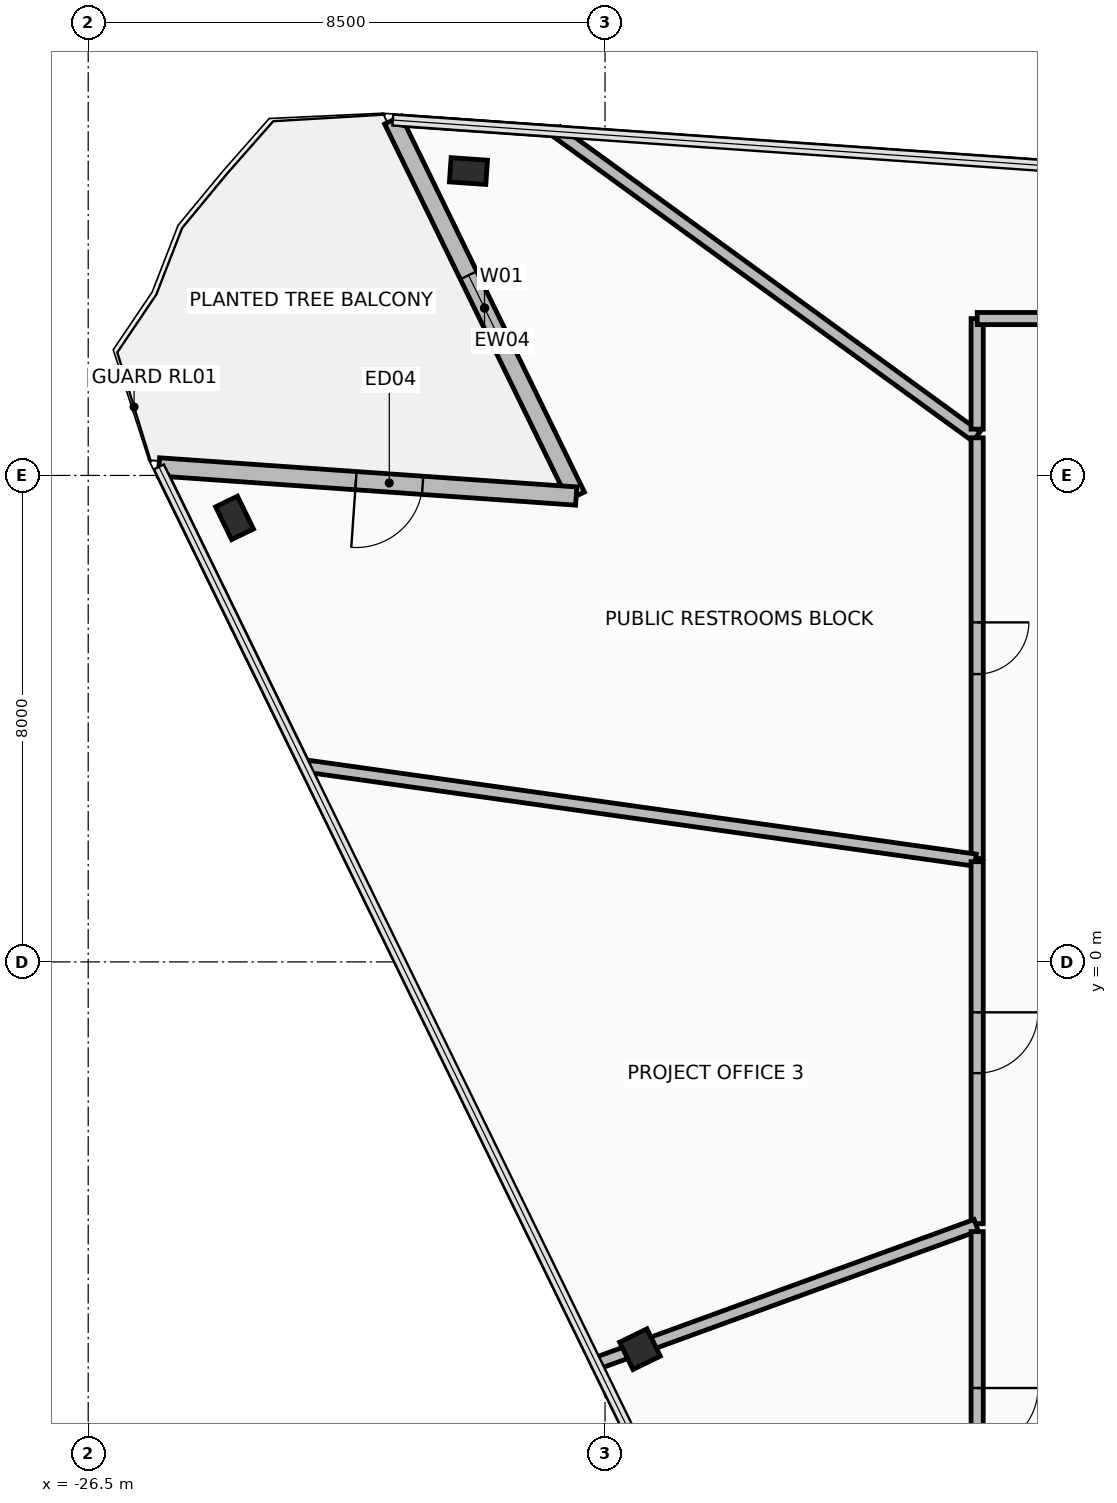
"""IFC4 building model, lengths in metres.
Left out: names, types, materials, properties, quantities, classifications, styles, units other than length and angle.
Written with IfcOpenShell. Run it as: python <this file> out.ifc"""

import sys

from ifc_helpers import new_model, si_unit, direction, frame, frame_2d, origin, origin_2d, place, context, subcontext, project, spatial, rectangle, hollow_rectangle, extrude, element, fill, save


model = new_model("IFC4")
c1 = context("Model", 3, precision=1e-05, world=origin(), true_north=direction((0.0, 1.0)))
c2 = subcontext(c1, "Body", "Model", "MODEL_VIEW")
j1 = project(units=[si_unit("LENGTHUNIT", "METRE"), si_unit("PLANEANGLEUNIT", "RADIAN")], contexts=[c1])
p1 = place(None, origin())
s1 = spatial("IfcSite", under=j1, at=p1, CompositionType="ELEMENT")
p2 = place(p1, origin())
s2 = spatial("IfcBuilding", under=s1, at=p2, CompositionType="ELEMENT")
p3 = place(p2, frame((0.0, 0.0, 237.85)))
s3 = spatial("IfcBuildingStorey", under=s2, at=p3, CompositionType="ELEMENT", Elevation=237.85)
p4 = place(p3, frame((-24.094, 7.302, 0.0), z_axis=(0.0, 0.0, 1.0), x_axis=(-0.438371146789, 0.898794046299, 0.0)))
e1 = element("IfcColumn", 1, at=p4, inside=s3, PredefinedType="COLUMN", context=c2, shape_type="SweptSolid", body=[
    extrude(hollow_rectangle(XDim=0.4, YDim=0.6, WallThickness=0.03, at=origin_2d()), origin(), (0.0, 0.0, 1.0), 3.6),
])
p5 = place(p3, frame((-17.426, -6.369, 0.0), z_axis=(0.0, 0.0, 1.0), x_axis=(-0.438371146789, 0.898794046299, 0.0)))
e2 = element("IfcColumn", 2, at=p5, inside=s3, PredefinedType="COLUMN", context=c2, shape_type="SweptSolid", body=[
    extrude(hollow_rectangle(XDim=0.5, YDim=0.5, WallThickness=0.032, at=origin_2d()), origin(), (0.0, 0.0, 1.0), 3.6),
])
p6 = place(p3, frame((-20.246, 13.006, 0.0), z_axis=(0.0, 0.0, 1.0), x_axis=(-0.99756405026, 0.069756473744, 0.0)))
e3 = element("IfcColumn", 3, at=p6, inside=s3, PredefinedType="COLUMN", context=c2, shape_type="SweptSolid", body=[
    extrude(hollow_rectangle(XDim=0.4, YDim=0.6, WallThickness=0.03, at=origin_2d()), origin(), (0.0, 0.0, 1.0), 3.6),
])
p7 = place(p3, frame((-21.49, 13.844, 0.0), z_axis=(0.0, 0.0, 1.0), x_axis=(0.438391471143, -0.898784133165, 0.0)))
e4 = element("IfcWall", 4, at=p7, inside=s3, PredefinedType="STANDARD", context=c2, shape_type="SweptSolid", body=[
    extrude(rectangle(XDim=6.88, YDim=0.3, at=frame_2d((3.44, 0.0))), origin(), (0.0, 0.0, 1.0), 2.765),
])
p8 = place(p7, frame((2.84, 0.0, 0.485)))
e5 = element("IfcOpeningElement", 5, at=p8, cuts=e4, PredefinedType="OPENING", context=c2, shape_type="SweptSolid", body=[
    extrude(rectangle(XDim=1.2, YDim=2.1, at=frame_2d((0.6, 1.05))), frame((0.0, 0.16, 0.0), z_axis=(0.0, -1.0, 0.0), x_axis=(1.0, 0.0, 0.0)), (0.0, 0.0, 1.0), 0.32),
])
p9 = place(p3, frame((-18.474, 7.661, 0.0), z_axis=(0.0, 0.0, 1.0), x_axis=(-0.997565982203, 0.069728840176, 0.0)))
e6 = element("IfcWall", 6, at=p9, inside=s3, PredefinedType="STANDARD", context=c2, shape_type="SweptSolid", body=[
    extrude(rectangle(XDim=6.88, YDim=0.3, at=frame_2d((3.44, 0.0))), origin(), (0.0, 0.0, 1.0), 2.765),
])
p10 = place(p9, frame((2.532, 0.0, 0.0)))
e7 = element("IfcOpeningElement", 7, at=p10, cuts=e6, PredefinedType="OPENING", context=c2, shape_type="SweptSolid", body=[
    extrude(rectangle(XDim=1.1, YDim=2.2, at=frame_2d((0.55, 1.1))), frame((0.0, 0.16, 0.0), z_axis=(0.0, -1.0, 0.0), x_axis=(1.0, 0.0, 0.0)), (0.0, 0.0, 1.0), 0.32),
])
p11 = place(p3, frame((-21.311, 13.832, 0.0), z_axis=(0.0, 0.0, 1.0), x_axis=(0.997559711148, -0.06981849823, 0.0)))
e8 = element("IfcWall", 8, at=p11, inside=s3, PredefinedType="PARTITIONING", context=c2, shape_type="SweptSolid", body=[
    extrude(rectangle(XDim=2.514, YDim=0.15, at=frame_2d((1.257, 0.0))), origin(), (0.0, 0.0, 1.0), 3.42),
])
p12 = place(p3, frame((-18.79, 13.652, 0.0), z_axis=(0.0, 0.0, 1.0), x_axis=(0.809024412074, -0.58777504257, 0.0)))
e9 = element("IfcWall", 9, at=p12, inside=s3, PredefinedType="PARTITIONING", context=c2, shape_type="SweptSolid", body=[
    extrude(rectangle(XDim=8.529, YDim=0.2, at=frame_2d((4.264, 0.0))), origin(), (0.0, 0.0, 1.0), 2.765),
])
p13 = place(p3, frame((-11.88, 8.619, 0.0), z_axis=(0.0, 0.0, 1.0), x_axis=(0.0, -1.0, 0.0)))
e10 = element("IfcWall", 10, at=p13, inside=s3, PredefinedType="PARTITIONING", context=c2, shape_type="SweptSolid", body=[
    extrude(rectangle(XDim=6.92, YDim=0.2, at=frame_2d((3.46, 0.0))), origin(), (0.0, 0.0, 1.0), 2.765),
])
p14 = place(p13, frame((3.035, 0.0, 0.0)))
e11 = element("IfcOpeningElement", 11, at=p14, cuts=e10, PredefinedType="OPENING", context=c2, shape_type="SweptSolid", body=[
    extrude(rectangle(XDim=0.85, YDim=2.1, at=frame_2d((0.425, 1.05))), frame((0.0, 0.11, 0.0), z_axis=(0.0, -1.0, 0.0), x_axis=(1.0, 0.0, 0.0)), (0.0, 0.0, 1.0), 0.22),
])
p15 = place(p3, frame((-11.908, 1.674, 0.0), z_axis=(0.0, 0.0, 1.0), x_axis=(-0.990268632002, 0.139169093096, 0.0)))
e12 = element("IfcWall", 12, at=p15, inside=s3, PredefinedType="PARTITIONING", context=c2, shape_type="SweptSolid", body=[
    extrude(rectangle(XDim=11.125, YDim=0.2, at=frame_2d((5.563, 0.0))), origin(), (0.0, 0.0, 1.0), 2.765),
])
p16 = place(p3, frame((-22.945, 3.236, 0.0), z_axis=(0.0, 0.0, 1.0), x_axis=(-0.438366217032, 0.898796450686, 0.0)))
e13 = element("IfcWall", 13, at=p16, inside=s3, PredefinedType="PARTITIONING", context=c2, shape_type="SweptSolid", body=[
    extrude(rectangle(XDim=5.278, YDim=0.15, at=frame_2d((2.639, 0.0))), origin(), (0.0, 0.0, 1.0), 3.42),
])
p17 = place(p3, frame((-11.88, 10.579, 0.0), z_axis=(0.0, 0.0, 1.0), x_axis=(0.0, -1.0, 0.0)))
e14 = element("IfcWall", 14, at=p17, inside=s3, PredefinedType="PARTITIONING", context=c2, shape_type="SweptSolid", body=[
    extrude(rectangle(XDim=1.818, YDim=0.2, at=frame_2d((0.909, 0.0))), origin(), (0.0, 0.0, 1.0), 2.915),
])
p18 = place(p3, frame((-5.277, 10.58, 0.0), z_axis=(0.0, 0.0, 1.0), x_axis=(-1.0, 0.0, 0.0)))
e15 = element("IfcWall", 15, at=p18, inside=s3, PredefinedType="PARTITIONING", context=c2, shape_type="SweptSolid", body=[
    extrude(rectangle(XDim=6.602, YDim=0.2, at=frame_2d((3.301, 0.0))), origin(), (0.0, 0.0, 1.0), 2.915),
])
p19 = place(p18, frame((2.801, 0.0, 0.0)))
e16 = element("IfcOpeningElement", 16, at=p19, cuts=e15, PredefinedType="OPENING", context=c2, shape_type="SweptSolid", body=[
    extrude(rectangle(XDim=1.0, YDim=2.15, at=frame_2d((0.5, 1.075))), frame((0.0, 0.11, 0.0), z_axis=(0.0, -1.0, 0.0), x_axis=(1.0, 0.0, 0.0)), (0.0, 0.0, 1.0), 0.22),
])
p20 = place(p3, frame((-11.88, 1.648, 0.0), z_axis=(0.0, 0.0, 1.0), x_axis=(0.0, -1.0, 0.0)))
e17 = element("IfcWall", 17, at=p20, inside=s3, PredefinedType="PARTITIONING", context=c2, shape_type="SweptSolid", body=[
    extrude(rectangle(XDim=5.954, YDim=0.2, at=frame_2d((2.977, 0.0))), origin(), (0.0, 0.0, 1.0), 3.42),
])
p21 = place(p20, frame((2.477, 0.0, 0.0)))
e18 = element("IfcOpeningElement", 18, at=p21, cuts=e17, PredefinedType="OPENING", context=c2, shape_type="SweptSolid", body=[
    extrude(rectangle(XDim=1.0, YDim=2.15, at=frame_2d((0.5, 1.075))), frame((0.0, 0.11, 0.0), z_axis=(0.0, -1.0, 0.0), x_axis=(1.0, 0.0, 0.0)), (0.0, 0.0, 1.0), 0.22),
])
p22 = place(p3, frame((-11.896, -4.33, 0.0), z_axis=(0.0, 0.0, 1.0), x_axis=(-0.939698738166, -0.342003335495, 0.0)))
e19 = element("IfcWall", 19, at=p22, inside=s3, PredefinedType="PARTITIONING", context=c2, shape_type="SweptSolid", body=[
    extrude(rectangle(XDim=6.627, YDim=0.2, at=frame_2d((3.314, 0.0))), origin(), (0.0, 0.0, 1.0), 2.765),
])
p23 = place(p3, frame((-11.88, -4.436, 0.0), z_axis=(0.0, 0.0, 1.0), x_axis=(0.0, -1.0, 0.0)))
e20 = element("IfcWall", 20, at=p23, inside=s3, PredefinedType="PARTITIONING", context=c2, shape_type="SweptSolid", body=[
    extrude(rectangle(XDim=6.144, YDim=0.2, at=frame_2d((3.072, 0.0))), origin(), (0.0, 0.0, 1.0), 2.915),
])
p24 = place(p23, frame((2.572, 0.0, 0.0)))
e21 = element("IfcOpeningElement", 21, at=p24, cuts=e20, PredefinedType="OPENING", context=c2, shape_type="SweptSolid", body=[
    extrude(rectangle(XDim=1.0, YDim=2.15, at=frame_2d((0.5, 1.075))), frame((0.0, 0.11, 0.0), z_axis=(0.0, -1.0, 0.0), x_axis=(1.0, 0.0, 0.0)), (0.0, 0.0, 1.0), 0.22),
])
p25 = place(p10, frame((1.1, 0.0, 0.0), z_axis=(0.0, 0.0, 1.0), x_axis=(-1.0, 0.0, 0.0)))
e22 = element("IfcDoor", 22, at=p25, inside=s3, OperationType="SINGLE_SWING_LEFT", PredefinedType="DOOR", context=c2, shape_type="SweptSolid", body=[
    extrude(rectangle(XDim=1.1, YDim=2.2, at=frame_2d((0.55, 1.1))), frame((0.0, 0.025, 0.0), z_axis=(0.0, -1.0, 0.0), x_axis=(1.0, 0.0, 0.0)), (0.0, 0.0, 1.0), 0.05),
])
fill(e7, e22)
p26 = place(p8, origin())
e23 = element("IfcWindow", 23, at=p26, inside=s3, PartitioningType="SINGLE_PANEL", PredefinedType="WINDOW", context=c2, shape_type="SweptSolid", body=[
    extrude(rectangle(XDim=1.2, YDim=2.1, at=frame_2d((0.6, 1.05))), frame((0.0, 0.03, 0.0), z_axis=(0.0, -1.0, 0.0), x_axis=(1.0, 0.0, 0.0)), (0.0, 0.0, 1.0), 0.06),
])
fill(e5, e23)
p27 = place(p14, origin())
e24 = element("IfcDoor", 24, at=p27, inside=s3, OperationType="SINGLE_SWING_RIGHT", PredefinedType="DOOR", context=c2, shape_type="SweptSolid", body=[
    extrude(rectangle(XDim=0.85, YDim=2.1, at=frame_2d((0.425, 1.05))), frame((0.0, 0.025, 0.0), z_axis=(0.0, -1.0, 0.0), x_axis=(1.0, 0.0, 0.0)), (0.0, 0.0, 1.0), 0.05),
])
fill(e11, e24)
p28 = place(p21, origin())
e25 = element("IfcDoor", 25, at=p28, inside=s3, OperationType="SINGLE_SWING_RIGHT", PredefinedType="DOOR", context=c2, shape_type="SweptSolid", body=[
    extrude(rectangle(XDim=1.0, YDim=2.15, at=frame_2d((0.5, 1.075))), frame((0.0, 0.025, 0.0), z_axis=(0.0, -1.0, 0.0), x_axis=(1.0, 0.0, 0.0)), (0.0, 0.0, 1.0), 0.05),
])
fill(e18, e25)
p29 = place(p24, origin())
e26 = element("IfcDoor", 26, at=p29, inside=s3, OperationType="SINGLE_SWING_RIGHT", PredefinedType="DOOR", context=c2, shape_type="SweptSolid", body=[
    extrude(rectangle(XDim=1.0, YDim=2.15, at=frame_2d((0.5, 1.075))), frame((0.0, 0.025, 0.0), z_axis=(0.0, -1.0, 0.0), x_axis=(1.0, 0.0, 0.0)), (0.0, 0.0, 1.0), 0.05),
])
fill(e21, e26)
save(model, sys.argv[1])
